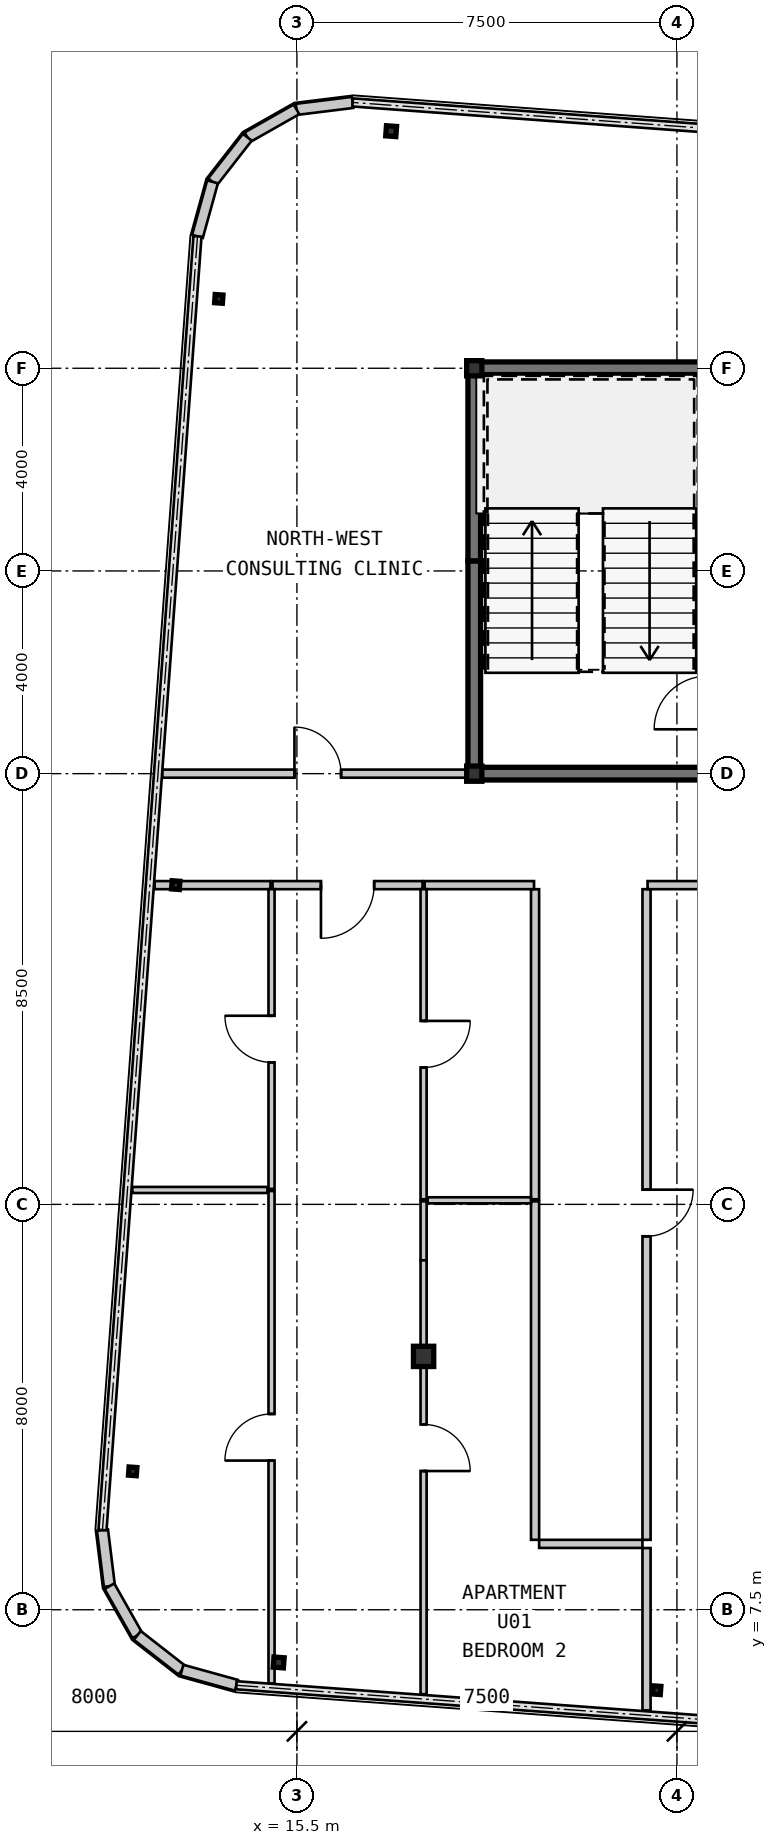
"""IFC4 building model, lengths in metres.
Left out: names, types, materials, properties, quantities, classifications, styles, units other than length and angle.
Written with IfcOpenShell. Run it as: python <this file> out.ifc"""

import sys

from ifc_helpers import new_model, si_unit, direction, frame, frame_2d, origin, origin_2d, place, context, subcontext, project, spatial, rectangle, hollow_rectangle, i_section, extrude, source, transform, mapped, element, fill, save


model = new_model("IFC4")
c1 = context("Model", 3, precision=1e-05, world=origin(), true_north=direction((0.0, 1.0)))
c2 = subcontext(c1, "Body", "Model", "MODEL_VIEW")
j1 = project(units=[si_unit("LENGTHUNIT", "METRE"), si_unit("PLANEANGLEUNIT", "RADIAN")], contexts=[c1])
p1 = place(None, origin())
s1 = spatial("IfcSite", under=j1, at=p1, CompositionType="ELEMENT")
p2 = place(p1, origin())
s2 = spatial("IfcBuilding", under=s1, at=p2, CompositionType="ELEMENT")
p3 = place(p2, frame((0.0, 0.0, 220.85)))
s3 = spatial("IfcBuildingStorey", under=s2, at=p3, CompositionType="ELEMENT", Elevation=220.85)
m1 = source(origin(), c2, "Body", "SweptSolid", [
    extrude(hollow_rectangle(XDim=0.3, YDim=0.3, WallThickness=0.012, at=origin_2d()), origin(), (0.0, 0.0, 1.0), 3.15),
])
for number, where, z_axis, x_axis in (
    (1, (19.0, 24.0, 0.0), (0.0, 0.0, 1.0), (1.0, 0.0, 0.0)),
    (2, (19.0, 32.0, 0.0), (0.0, 0.0, 1.0), (1.0, 0.0, 0.0)),
):
    element("IfcColumn", number, at=place(p3, frame(where, z_axis=z_axis, x_axis=x_axis)), inside=s3, PredefinedType="COLUMN", context=c2, shape_type="MappedRepresentation", body=[
        mapped(m1, transform((0.0, 0.0, 0.0), scale=1.0)),
    ])
m2 = source(origin(), c2, "Body", "SweptSolid", [
    extrude(hollow_rectangle(XDim=0.4, YDim=0.4, WallThickness=0.016, at=origin_2d()), origin(), (0.0, 0.0, 1.0), 3.15),
])
p4 = place(p3, frame((18.0, 12.5, 0.0), z_axis=(0.0, 0.0, 1.0), x_axis=(1.0, 0.0, 0.0)))
e3 = element("IfcColumn", 3, at=p4, inside=s3, PredefinedType="COLUMN", context=c2, shape_type="MappedRepresentation", body=[
    mapped(m2, transform((0.0, 0.0, 0.0), scale=1.0)),
])
m3 = source(origin(), c2, "Body", "SweptSolid", [
    extrude(hollow_rectangle(XDim=0.2, YDim=0.2, WallThickness=0.009, at=origin_2d()), origin(), (0.0, 0.0, 1.0), 3.15),
])
p5 = place(p3, frame((15.141, 6.46, 0.0), z_axis=(0.0, 0.0, 1.0), x_axis=(0.997314477224, -0.073238197128, 0.0)))
e4 = element("IfcColumn", 4, at=p5, inside=s3, PredefinedType="COLUMN", context=c2, shape_type="MappedRepresentation", body=[
    mapped(m3, transform((0.0, 0.0, 0.0), scale=1.0)),
])
m4 = source(origin(), c2, "Body", "SweptSolid", [
    extrude(i_section(OverallWidth=0.154, OverallDepth=0.162, WebThickness=0.008, FlangeThickness=0.011, at=origin_2d()), origin(), (0.0, 0.0, 1.0), 3.15),
])
p6 = place(p3, frame((22.601, 5.912, 0.0), z_axis=(0.0, 0.0, 1.0), x_axis=(0.997314477224, -0.073238197128, 0.0)))
e5 = element("IfcColumn", 5, at=p6, inside=s3, PredefinedType="COLUMN", context=c2, shape_type="MappedRepresentation", body=[
    mapped(m4, transform((0.0, 0.0, 0.0), scale=1.0)),
])
p7 = place(p3, frame((17.36, 36.679, 0.0), z_axis=(0.0, 0.0, 1.0), x_axis=(0.997314477224, -0.073238197128, 0.0)))
e6 = element("IfcColumn", 6, at=p7, inside=s3, PredefinedType="COLUMN", context=c2, shape_type="MappedRepresentation", body=[
    mapped(m3, transform((0.0, 0.0, 0.0), scale=1.0)),
])
for number, where, z_axis, x_axis in (
    (7, (12.259, 10.231, 0.0), (0.0, 0.0, 1.0), (0.997, -0.073, 0.0)),
    (8, (13.109, 21.8, 0.0), (0.0, 0.0, 1.0), (0.997, -0.073, 0.0)),
    (9, (13.958, 33.369, 0.0), (0.0, 0.0, 1.0), (0.997, -0.073, 0.0)),
):
    element("IfcColumn", number, at=place(p3, frame(where, z_axis=z_axis, x_axis=x_axis)), inside=s3, PredefinedType="COLUMN", context=c2, shape_type="MappedRepresentation", body=[
        mapped(m4, transform((0.0, 0.0, 0.0), scale=1.0)),
    ])
m5 = source(origin(), c2, "Body", "SweptSolid", [
    extrude(rectangle(XDim=1.116, YDim=0.22, at=frame_2d((0.558, 0.0))), origin(), (0.0, 0.0, 1.0), 2.93),
])
p8 = place(p3, frame((16.599, 37.246, 0.0), z_axis=(0.0, 0.0, 1.0), x_axis=(-0.992441899189, -0.122715429897, 0.0)))
e10 = element("IfcWall", 10, at=p8, inside=s3, PredefinedType="SOLIDWALL", context=c2, shape_type="MappedRepresentation", body=[
    mapped(m5, transform((0.0, 0.0, 0.0), scale=1.0)),
])
m6 = source(origin(), c2, "Body", "SweptSolid", [
    extrude(rectangle(XDim=1.116, YDim=0.22, at=frame_2d((0.558, 0.0))), origin(), (0.0, 0.0, 1.0), 2.93),
])
p9 = place(p3, frame((15.492, 37.109, 0.0), z_axis=(0.0, 0.0, 1.0), x_axis=(-0.869934579941, -0.493167138628, 0.0)))
e11 = element("IfcWall", 11, at=p9, inside=s3, PredefinedType="SOLIDWALL", context=c2, shape_type="MappedRepresentation", body=[
    mapped(m6, transform((0.0, 0.0, 0.0), scale=1.0)),
])
m7 = source(origin(), c2, "Body", "SweptSolid", [
    extrude(rectangle(XDim=1.116, YDim=0.22, at=frame_2d((0.558, 0.0))), origin(), (0.0, 0.0, 1.0), 2.93),
])
p10 = place(p3, frame((14.521, 36.559, 0.0), z_axis=(0.0, 0.0, 1.0), x_axis=(-0.614909386406, -0.788597772321, 0.0)))
e12 = element("IfcWall", 12, at=p10, inside=s3, PredefinedType="SOLIDWALL", context=c2, shape_type="MappedRepresentation", body=[
    mapped(m7, transform((0.0, 0.0, 0.0), scale=1.0)),
])
p11 = place(p3, frame((13.835, 35.679, 0.0), z_axis=(0.0, 0.0, 1.0), x_axis=(-0.266300605026, -0.963890028874, 0.0)))
e13 = element("IfcWall", 13, at=p11, inside=s3, PredefinedType="SOLIDWALL", context=c2, shape_type="MappedRepresentation", body=[
    mapped(m6, transform((0.0, 0.0, 0.0), scale=1.0)),
])
for number, where, z_axis, x_axis in (
    (14, (11.663, 9.072, 0.0), (0.0, 0.0, 1.0), (0.123, -0.992, 0.0)),
    (15, (11.8, 7.965, 0.0), (0.0, 0.0, 1.0), (0.493, -0.87, 0.0)),
    (16, (12.35, 6.994, 0.0), (0.0, 0.0, 1.0), (0.789, -0.615, 0.0)),
):
    element("IfcWall", number, at=place(p3, frame(where, z_axis=z_axis, x_axis=x_axis)), inside=s3, PredefinedType="SOLIDWALL", context=c2, shape_type="MappedRepresentation", body=[
        mapped(m7, transform((0.0, 0.0, 0.0), scale=1.0)),
    ])
p12 = place(p3, frame((13.23, 6.307, 0.0), z_axis=(0.0, 0.0, 1.0), x_axis=(0.963890028874, -0.266300605026, 0.0)))
e17 = element("IfcWall", 17, at=p12, inside=s3, PredefinedType="SOLIDWALL", context=c2, shape_type="MappedRepresentation", body=[
    mapped(m6, transform((0.0, 0.0, 0.0), scale=1.0)),
])
m8 = source(origin(), c2, "Body", "SweptSolid", [
    extrude(rectangle(XDim=9.125, YDim=0.25, at=frame_2d((4.562, 0.0))), origin(), (0.0, 0.0, 1.0), 2.93),
])
p13 = place(p3, frame((18.875, 32.0, 0.0), z_axis=(0.0, 0.0, 1.0), x_axis=(1.0, 0.0, 0.0)))
e18 = element("IfcWall", 18, at=p13, inside=s3, PredefinedType="SHEAR", context=c2, shape_type="MappedRepresentation", body=[
    mapped(m8, transform((0.0, 0.0, 0.0), scale=1.0)),
])
m9 = source(origin(), c2, "Body", "SweptSolid", [
    extrude(rectangle(XDim=4.075, YDim=0.25, at=frame_2d((2.038, 0.0))), origin(), (0.0, 0.0, 1.0), 2.93),
])
p14 = place(p3, frame((19.0, 24.125, 0.0), z_axis=(0.0, 0.0, 1.0), x_axis=(0.0, 1.0, 0.0)))
e19 = element("IfcWall", 19, at=p14, inside=s3, PredefinedType="SHEAR", context=c2, shape_type="MappedRepresentation", body=[
    mapped(m9, transform((0.0, 0.0, 0.0), scale=1.0)),
])
m10 = source(origin(), c2, "Body", "SweptSolid", [
    extrude(rectangle(XDim=3.675, YDim=0.25, at=frame_2d((1.837, 0.0))), origin(), (0.0, 0.0, 1.0), 2.93),
])
p15 = place(p3, frame((19.0, 28.2, 0.0), z_axis=(0.0, 0.0, 1.0), x_axis=(0.0, 1.0, 0.0)))
e20 = element("IfcWall", 20, at=p15, inside=s3, PredefinedType="SHEAR", context=c2, shape_type="MappedRepresentation", body=[
    mapped(m10, transform((0.0, 0.0, 0.0), scale=1.0)),
])
m11 = source(origin(), c2, "Body", "SweptSolid", [
    extrude(rectangle(XDim=4.85, YDim=0.25, at=frame_2d((2.425, 0.0))), origin(), (0.0, 0.0, 1.0), 2.93),
])
p16 = place(p3, frame((18.875, 24.0, 0.0), z_axis=(0.0, 0.0, 1.0), x_axis=(1.0, 0.0, 0.0)))
e21 = element("IfcWall", 21, at=p16, inside=s3, PredefinedType="SHEAR", context=c2, shape_type="MappedRepresentation", body=[
    mapped(m11, transform((0.0, 0.0, 0.0), scale=1.0)),
])
m12 = source(origin(), c2, "Body", "SweptSolid", [
    extrude(rectangle(XDim=6.032, YDim=0.16, at=frame_2d((3.016, 0.0))), origin(), (0.0, 0.0, 1.0), 2.93),
])
p17 = place(p3, frame((12.843, 24.0, 0.0), z_axis=(0.0, 0.0, 1.0), x_axis=(1.0, 0.0, 0.0)))
e22 = element("IfcWall", 22, at=p17, inside=s3, PredefinedType="PARTITIONING", context=c2, shape_type="MappedRepresentation", body=[
    mapped(m12, transform((0.0, 0.0, 0.0), scale=1.0)),
])
m13 = source(origin(), c2, "Body", "SweptSolid", [
    extrude(rectangle(XDim=0.92, YDim=2.1, at=frame_2d((0.46, 1.05))), frame((0.0, 0.09, 0.0), z_axis=(0.0, -1.0, 0.0), x_axis=(1.0, 0.0, 0.0)), (0.0, 0.0, 1.0), 0.18),
])
p18 = place(p17, frame((2.608, 0.0, 0.0)))
e23 = element("IfcOpeningElement", 23, at=p18, cuts=e22, PredefinedType="OPENING", context=c2, shape_type="MappedRepresentation", body=[
    mapped(m13, transform((0.0, 0.0, 0.0), scale=1.0)),
])
m14 = source(origin(), c2, "Body", "SweptSolid", [
    extrude(rectangle(XDim=2.96, YDim=0.16, at=frame_2d((1.48, 0.0))), origin(), (0.0, 0.0, 1.0), 2.93),
])
p19 = place(p3, frame((17.98, 21.8, 0.0), z_axis=(0.0, 0.0, 1.0), x_axis=(-1.0, 0.0, 0.0)))
e24 = element("IfcWall", 24, at=p19, inside=s3, PredefinedType="PARTITIONING", context=c2, shape_type="MappedRepresentation", body=[
    mapped(m14, transform((0.0, 0.0, 0.0), scale=1.0)),
])
m15 = source(origin(), c2, "Body", "SweptSolid", [
    extrude(rectangle(XDim=1.05, YDim=2.1, at=frame_2d((0.525, 1.05))), frame((0.0, 0.09, 0.0), z_axis=(0.0, -1.0, 0.0), x_axis=(1.0, 0.0, 0.0)), (0.0, 0.0, 1.0), 0.18),
])
p20 = place(p19, frame((0.955, 0.0, 0.0)))
e25 = element("IfcOpeningElement", 25, at=p20, cuts=e24, PredefinedType="OPENING", context=c2, shape_type="MappedRepresentation", body=[
    mapped(m15, transform((0.0, 0.0, 0.0), scale=1.0)),
])
m16 = source(origin(), c2, "Body", "SweptSolid", [
    extrude(rectangle(XDim=6.12, YDim=0.16, at=frame_2d((3.06, 0.0))), origin(), (0.0, 0.0, 1.0), 2.93),
])
p21 = place(p3, frame((20.2, 15.6, 0.0), z_axis=(0.0, 0.0, 1.0), x_axis=(0.0, 1.0, 0.0)))
e26 = element("IfcWall", 26, at=p21, inside=s3, PredefinedType="PARTITIONING", context=c2, shape_type="MappedRepresentation", body=[
    mapped(m16, transform((0.0, 0.0, 0.0), scale=1.0)),
])
m17 = source(origin(), c2, "Body", "SweptSolid", [
    extrude(rectangle(XDim=2.159, YDim=0.16, at=frame_2d((1.08, 0.0))), origin(), (0.0, 0.0, 1.0), 2.93),
])
p22 = place(p3, frame((20.18, 21.8, 0.0), z_axis=(0.0, 0.0, 1.0), x_axis=(-1.0, 0.0, 0.0)))
e27 = element("IfcWall", 27, at=p22, inside=s3, PredefinedType="PARTITIONING", context=c2, shape_type="MappedRepresentation", body=[
    mapped(m17, transform((0.0, 0.0, 0.0), scale=1.0)),
])
m18 = source(origin(), c2, "Body", "SweptSolid", [
    extrude(rectangle(XDim=2.286, YDim=0.16, at=frame_2d((1.143, 0.0))), origin(), (0.0, 0.0, 1.0), 2.93),
])
p23 = place(p3, frame((14.979, 21.8, 0.0), z_axis=(0.0, 0.0, 1.0), x_axis=(-1.0, 0.0, 0.0)))
e28 = element("IfcWall", 28, at=p23, inside=s3, PredefinedType="PARTITIONING", context=c2, shape_type="MappedRepresentation", body=[
    mapped(m18, transform((0.0, 0.0, 0.0), scale=1.0)),
])
m19 = source(origin(), c2, "Body", "SweptSolid", [
    extrude(rectangle(XDim=6.68, YDim=0.16, at=frame_2d((3.34, 0.0))), origin(), (0.0, 0.0, 1.0), 2.93),
])
p24 = place(p3, frame((20.2, 8.88, 0.0), z_axis=(0.0, 0.0, 1.0), x_axis=(0.0, 1.0, 0.0)))
e29 = element("IfcWall", 29, at=p24, inside=s3, PredefinedType="PARTITIONING", context=c2, shape_type="MappedRepresentation", body=[
    mapped(m19, transform((0.0, 0.0, 0.0), scale=1.0)),
])
m20 = source(origin(), c2, "Body", "SweptSolid", [
    extrude(rectangle(XDim=2.04, YDim=0.16, at=frame_2d((1.02, 0.0))), origin(), (0.0, 0.0, 1.0), 2.93),
])
p25 = place(p3, frame((22.32, 8.8, 0.0), z_axis=(0.0, 0.0, 1.0), x_axis=(-1.0, 0.0, 0.0)))
e30 = element("IfcWall", 30, at=p25, inside=s3, PredefinedType="PARTITIONING", context=c2, shape_type="MappedRepresentation", body=[
    mapped(m20, transform((0.0, 0.0, 0.0), scale=1.0)),
])
m21 = source(origin(), c2, "Body", "SweptSolid", [
    extrude(rectangle(XDim=12.84, YDim=0.16, at=frame_2d((6.42, 0.0))), origin(), (0.0, 0.0, 1.0), 2.93),
])
p26 = place(p3, frame((22.4, 21.72, 0.0), z_axis=(0.0, 0.0, 1.0), x_axis=(0.0, -1.0, 0.0)))
e31 = element("IfcWall", 31, at=p26, inside=s3, PredefinedType="PARTITIONING", context=c2, shape_type="MappedRepresentation", body=[
    mapped(m21, transform((0.0, 0.0, 0.0), scale=1.0)),
])
p27 = place(p26, frame((5.93, 0.0, 0.0)))
e32 = element("IfcOpeningElement", 32, at=p27, cuts=e31, PredefinedType="OPENING", context=c2, shape_type="MappedRepresentation", body=[
    mapped(m13, transform((0.0, 0.0, 0.0), scale=1.0)),
])
m22 = source(origin(), c2, "Body", "SweptSolid", [
    extrude(rectangle(XDim=6.259, YDim=0.16, at=frame_2d((3.13, 0.0))), origin(), (0.0, 0.0, 1.0), 2.93),
])
p28 = place(p3, frame((28.68, 21.8, 0.0), z_axis=(0.0, 0.0, 1.0), x_axis=(-1.0, 0.0, 0.0)))
e33 = element("IfcWall", 33, at=p28, inside=s3, PredefinedType="PARTITIONING", context=c2, shape_type="MappedRepresentation", body=[
    mapped(m22, transform((0.0, 0.0, 0.0), scale=1.0)),
])
m23 = source(origin(), c2, "Body", "SweptSolid", [
    extrude(rectangle(XDim=6.12, YDim=0.12, at=frame_2d((3.06, 0.0))), origin(), (0.0, 0.0, 1.0), 2.93),
])
p29 = place(p3, frame((18.0, 21.72, 0.0), z_axis=(0.0, 0.0, 1.0), x_axis=(0.0, -1.0, 0.0)))
e34 = element("IfcWall", 34, at=p29, inside=s3, PredefinedType="PARTITIONING", context=c2, shape_type="MappedRepresentation", body=[
    mapped(m23, transform((0.0, 0.0, 0.0), scale=1.0)),
])
m24 = source(origin(), c2, "Body", "SweptSolid", [
    extrude(rectangle(XDim=0.92, YDim=2.1, at=frame_2d((0.46, 1.05))), frame((0.0, 0.07, 0.0), z_axis=(0.0, -1.0, 0.0), x_axis=(1.0, 0.0, 0.0)), (0.0, 0.0, 1.0), 0.14),
])
p30 = place(p29, frame((2.6, 0.0, 0.0)))
e35 = element("IfcOpeningElement", 35, at=p30, cuts=e34, PredefinedType="OPENING", context=c2, shape_type="MappedRepresentation", body=[
    mapped(m24, transform((0.0, 0.0, 0.0), scale=1.0)),
])
m25 = source(origin(), c2, "Body", "SweptSolid", [
    extrude(rectangle(XDim=5.916, YDim=0.12, at=frame_2d((2.958, 0.0))), origin(), (0.0, 0.0, 1.0), 2.93),
])
p31 = place(p3, frame((14.999, 15.804, 0.0), z_axis=(0.0, 0.0, 1.0), x_axis=(0.0, 1.0, 0.0)))
e36 = element("IfcWall", 36, at=p31, inside=s3, PredefinedType="PARTITIONING", context=c2, shape_type="MappedRepresentation", body=[
    mapped(m25, transform((0.0, 0.0, 0.0), scale=1.0)),
])
p32 = place(p31, frame((2.498, 0.0, 0.0)))
e37 = element("IfcOpeningElement", 37, at=p32, cuts=e36, PredefinedType="OPENING", context=c2, shape_type="MappedRepresentation", body=[
    mapped(m24, transform((0.0, 0.0, 0.0), scale=1.0)),
])
m26 = source(origin(), c2, "Body", "SweptSolid", [
    extrude(rectangle(XDim=9.72, YDim=0.12, at=frame_2d((4.86, 0.0))), origin(), (0.0, 0.0, 1.0), 2.93),
])
p33 = place(p3, frame((14.999, 6.044, 0.0), z_axis=(0.0, 0.0, 1.0), x_axis=(0.0, 1.0, 0.0)))
e38 = element("IfcWall", 38, at=p33, inside=s3, PredefinedType="PARTITIONING", context=c2, shape_type="MappedRepresentation", body=[
    mapped(m26, transform((0.0, 0.0, 0.0), scale=1.0)),
])
p34 = place(p33, frame((4.4, 0.0, 0.0)))
e39 = element("IfcOpeningElement", 39, at=p34, cuts=e38, PredefinedType="OPENING", context=c2, shape_type="MappedRepresentation", body=[
    mapped(m24, transform((0.0, 0.0, 0.0), scale=1.0)),
])
m27 = source(origin(), c2, "Body", "SweptSolid", [
    extrude(rectangle(XDim=1.164, YDim=0.12, at=frame_2d((0.582, 0.0))), origin(), (0.0, 0.0, 1.0), 2.93),
])
p35 = place(p3, frame((18.0, 15.56, 0.0), z_axis=(0.0, 0.0, 1.0), x_axis=(0.0, -1.0, 0.0)))
e40 = element("IfcWall", 40, at=p35, inside=s3, PredefinedType="PARTITIONING", context=c2, shape_type="MappedRepresentation", body=[
    mapped(m27, transform((0.0, 0.0, 0.0), scale=1.0)),
])
m28 = source(origin(), c2, "Body", "SweptSolid", [
    extrude(rectangle(XDim=1.901, YDim=0.12, at=frame_2d((0.951, 0.0))), origin(), (0.0, 0.0, 1.0), 2.397),
])
p36 = place(p3, frame((18.0, 14.396, 0.0), z_axis=(0.0, 0.0, 1.0), x_axis=(0.0, -1.0, 0.0)))
e41 = element("IfcWall", 41, at=p36, inside=s3, PredefinedType="PARTITIONING", context=c2, shape_type="MappedRepresentation", body=[
    mapped(m28, transform((0.0, 0.0, 0.0), scale=1.0)),
])
m29 = source(origin(), c2, "Body", "SweptSolid", [
    extrude(rectangle(XDim=6.66, YDim=0.12, at=frame_2d((3.33, 0.0))), origin(), (0.0, 0.0, 1.0), 2.93),
])
p37 = place(p3, frame((18.0, 12.495, 0.0), z_axis=(0.0, 0.0, 1.0), x_axis=(0.0, -1.0, 0.0)))
e42 = element("IfcWall", 42, at=p37, inside=s3, PredefinedType="PARTITIONING", context=c2, shape_type="MappedRepresentation", body=[
    mapped(m29, transform((0.0, 0.0, 0.0), scale=1.0)),
])
p38 = place(p37, frame((1.337, 0.0, 0.0)))
e43 = element("IfcOpeningElement", 43, at=p38, cuts=e42, PredefinedType="OPENING", context=c2, shape_type="MappedRepresentation", body=[
    mapped(m24, transform((0.0, 0.0, 0.0), scale=1.0)),
])
m30 = source(origin(), c2, "Body", "SweptSolid", [
    extrude(rectangle(XDim=2.04, YDim=0.12, at=frame_2d((1.02, 0.0))), origin(), (0.0, 0.0, 1.0), 2.93),
])
p39 = place(p3, frame((20.12, 15.58, 0.0), z_axis=(0.0, 0.0, 1.0), x_axis=(-1.0, 0.0, 0.0)))
e44 = element("IfcWall", 44, at=p39, inside=s3, PredefinedType="PARTITIONING", context=c2, shape_type="MappedRepresentation", body=[
    mapped(m30, transform((0.0, 0.0, 0.0), scale=1.0)),
])
m31 = source(origin(), c2, "Body", "SweptSolid", [
    extrude(rectangle(XDim=2.667, YDim=0.12, at=frame_2d((1.334, 0.0))), origin(), (0.0, 0.0, 1.0), 2.93),
])
p40 = place(p3, frame((14.919, 15.784, 0.0), z_axis=(0.0, 0.0, 1.0), x_axis=(-1.0, 0.0, 0.0)))
e45 = element("IfcWall", 45, at=p40, inside=s3, PredefinedType="PARTITIONING", context=c2, shape_type="MappedRepresentation", body=[
    mapped(m31, transform((0.0, 0.0, 0.0), scale=1.0)),
])
m32 = source(origin(), c2, "Body", "SweptSolid", [
    extrude(rectangle(XDim=3.204, YDim=0.16, at=frame_2d((1.602, 0.0))), origin(), (0.0, 0.0, 1.0), 2.93),
])
p41 = place(p3, frame((22.4, 8.718, 0.0), z_axis=(0.0, 0.0, 1.0), x_axis=(0.0, -1.0, 0.0)))
e46 = element("IfcWall", 46, at=p41, inside=s3, PredefinedType="PARTITIONING", context=c2, shape_type="MappedRepresentation", body=[
    mapped(m32, transform((0.0, 0.0, 0.0), scale=1.0)),
])
m33 = source(origin(), c2, "Body", "SweptSolid", [
    extrude(rectangle(XDim=0.92, YDim=2.1, at=frame_2d((0.46, 1.05))), frame((0.0, 0.025, 0.0), z_axis=(0.0, -1.0, 0.0), x_axis=(1.0, 0.0, 0.0)), (0.0, 0.0, 1.0), 0.05),
])
p42 = place(p18, origin())
e47 = element("IfcDoor", 47, at=p42, inside=s3, OperationType="SINGLE_SWING_LEFT", PredefinedType="DOOR", context=c2, shape_type="MappedRepresentation", body=[
    mapped(m33, transform((0.0, 0.0, 0.0), scale=1.0)),
])
fill(e23, e47)
m34 = source(origin(), c2, "Body", "SweptSolid", [
    extrude(rectangle(XDim=1.05, YDim=2.1, at=frame_2d((0.525, 1.05))), frame((0.0, 0.025, 0.0), z_axis=(0.0, -1.0, 0.0), x_axis=(1.0, 0.0, 0.0)), (0.0, 0.0, 1.0), 0.05),
])
p43 = place(p20, origin())
e48 = element("IfcDoor", 48, at=p43, inside=s3, OperationType="SINGLE_SWING_RIGHT", PredefinedType="DOOR", context=c2, shape_type="MappedRepresentation", body=[
    mapped(m34, transform((0.0, 0.0, 0.0), scale=1.0)),
])
fill(e25, e48)
p44 = place(p27, origin())
e49 = element("IfcDoor", 49, at=p44, inside=s3, OperationType="SINGLE_SWING_LEFT", PredefinedType="DOOR", context=c2, shape_type="MappedRepresentation", body=[
    mapped(m33, transform((0.0, 0.0, 0.0), scale=1.0)),
])
fill(e32, e49)
p45 = place(p30, origin())
e50 = element("IfcDoor", 50, at=p45, inside=s3, OperationType="SINGLE_SWING_LEFT", PredefinedType="DOOR", context=c2, shape_type="MappedRepresentation", body=[
    mapped(m33, transform((0.0, 0.0, 0.0), scale=1.0)),
])
fill(e35, e50)
p46 = place(p32, origin())
e51 = element("IfcDoor", 51, at=p46, inside=s3, OperationType="SINGLE_SWING_RIGHT", PredefinedType="DOOR", context=c2, shape_type="MappedRepresentation", body=[
    mapped(m33, transform((0.0, 0.0, 0.0), scale=1.0)),
])
fill(e37, e51)
p47 = place(p34, origin())
e52 = element("IfcDoor", 52, at=p47, inside=s3, OperationType="SINGLE_SWING_LEFT", PredefinedType="DOOR", context=c2, shape_type="MappedRepresentation", body=[
    mapped(m33, transform((0.0, 0.0, 0.0), scale=1.0)),
])
fill(e39, e52)
p48 = place(p38, origin())
e53 = element("IfcDoor", 53, at=p48, inside=s3, OperationType="SINGLE_SWING_RIGHT", PredefinedType="DOOR", context=c2, shape_type="MappedRepresentation", body=[
    mapped(m33, transform((0.0, 0.0, 0.0), scale=1.0)),
])
fill(e43, e53)
save(model, sys.argv[1])
